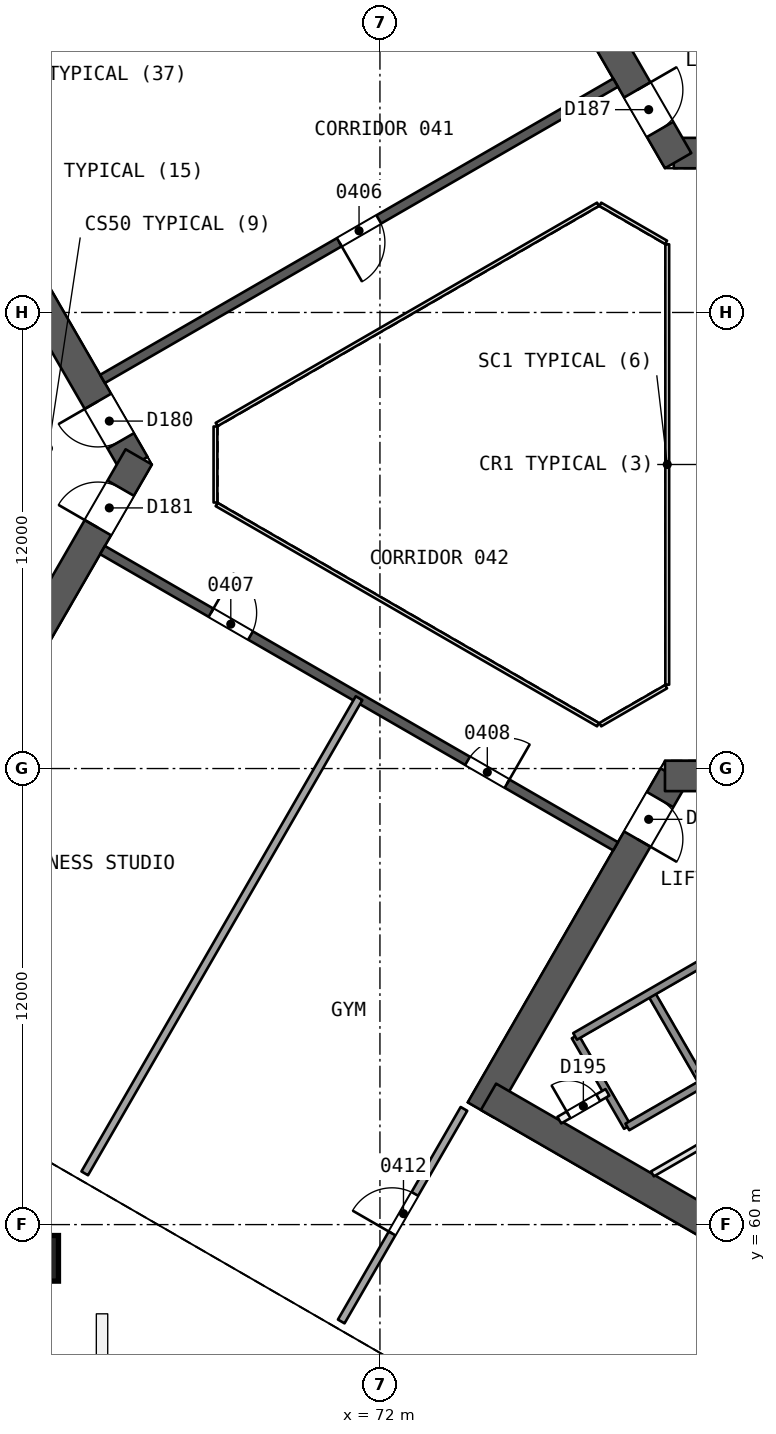
"""IFC4 building model, lengths in metres.
Left out: names, types, materials, properties, quantities, classifications, styles, units other than length and angle.
Written with IfcOpenShell. Run it as: python <this file> out.ifc"""

import sys

from ifc_helpers import new_model, si_unit, direction, frame, frame_2d, origin, origin_2d, place, context, subcontext, project, spatial, rectangle, extrude, element, fill, save


model = new_model("IFC4")
c1 = context("Model", 3, precision=1e-05, world=origin(), true_north=direction((0.0, 1.0)))
c2 = subcontext(c1, "Body", "Model", "MODEL_VIEW")
j1 = project(units=[si_unit("LENGTHUNIT", "METRE"), si_unit("PLANEANGLEUNIT", "RADIAN")], contexts=[c1])
p1 = place(None, origin())
s1 = spatial("IfcSite", under=j1, at=p1, CompositionType="ELEMENT")
p2 = place(p1, origin())
s2 = spatial("IfcBuilding", under=s1, at=p2, CompositionType="ELEMENT")
p3 = place(p2, frame((0.0, 0.0, 25.4)))
s3 = spatial("IfcBuildingStorey", under=s2, at=p3, CompositionType="ELEMENT", Elevation=25.4)
p4 = place(p3, frame((65.538, 80.0, 0.0), z_axis=(0.0, 0.0, 1.0), x_axis=(-0.49999662545, 0.866027352073, 0.0)))
e1 = element("IfcWall", 1, at=p4, inside=s3, PredefinedType="SHEAR", context=c2, shape_type="SweptSolid", body=[
    extrude(rectangle(XDim=10.149, YDim=0.8, at=frame_2d((5.074, 0.0))), origin(), (0.0, 0.0, 1.0), 4.6),
])
p5 = place(p4, frame((0.719, 0.0, 0.0)))
e2 = element("IfcOpeningElement", 2, at=p5, cuts=e1, PredefinedType="OPENING", context=c2, shape_type="SweptSolid", body=[
    extrude(rectangle(XDim=1.2, YDim=2.1, at=frame_2d((0.6, 1.05))), frame((0.0, 0.411, 0.0), z_axis=(0.0, -1.0, 0.0), x_axis=(1.0, 0.0, 0.0)), (0.0, 0.0, 1.0), 0.821),
])
p6 = place(p3, frame((60.664, 71.557, 0.0), z_axis=(0.0, 0.0, 1.0), x_axis=(0.50000409368, 0.866023040284, 0.0)))
e3 = element("IfcWall", 3, at=p6, inside=s3, PredefinedType="SHEAR", context=c2, shape_type="SweptSolid", body=[
    extrude(rectangle(XDim=9.98, YDim=0.8, at=frame_2d((4.99, 0.0))), origin(), (0.0, 0.0, 1.0), 4.6),
])
p7 = place(p6, frame((7.83, 0.0, 0.0)))
e4 = element("IfcOpeningElement", 4, at=p7, cuts=e3, PredefinedType="OPENING", context=c2, shape_type="SweptSolid", body=[
    extrude(rectangle(XDim=1.2, YDim=2.1, at=frame_2d((0.6, 1.05))), frame((0.0, 0.411, 0.0), z_axis=(0.0, -1.0, 0.0), x_axis=(1.0, 0.0, 0.0)), (0.0, 0.0, 1.0), 0.821),
])
p8 = place(p3, frame((79.731, 88.194, 0.0), z_axis=(0.0, 0.0, 1.0), x_axis=(1.0, 0.0, 0.0)))
e5 = element("IfcWall", 5, at=p8, inside=s3, PredefinedType="SHEAR", context=c2, shape_type="SweptSolid", body=[
    extrude(rectangle(XDim=10.149, YDim=0.8, at=frame_2d((5.074, 0.0))), origin(), (0.0, 0.0, 1.0), 4.6),
])
p9 = place(p8, frame((0.719, 0.0, 0.0)))
e6 = element("IfcOpeningElement", 6, at=p9, cuts=e5, PredefinedType="OPENING", context=c2, shape_type="SweptSolid", body=[
    extrude(rectangle(XDim=1.2, YDim=2.1, at=frame_2d((0.6, 1.05))), frame((0.0, 0.411, 0.0), z_axis=(0.0, -1.0, 0.0), x_axis=(1.0, 0.0, 0.0)), (0.0, 0.0, 1.0), 0.821),
])
p10 = place(p3, frame((74.856, 96.637, 0.0), z_axis=(0.0, 0.0, 1.0), x_axis=(0.499993500917, -0.866029155999, 0.0)))
e7 = element("IfcWall", 7, at=p10, inside=s3, PredefinedType="SHEAR", context=c2, shape_type="SweptSolid", body=[
    extrude(rectangle(XDim=9.98, YDim=0.8, at=frame_2d((4.99, 0.0))), origin(), (0.0, 0.0, 1.0), 4.6),
])
p11 = place(p10, frame((7.83, 0.0, 0.0)))
e8 = element("IfcOpeningElement", 8, at=p11, cuts=e7, PredefinedType="OPENING", context=c2, shape_type="SweptSolid", body=[
    extrude(rectangle(XDim=1.2, YDim=2.1, at=frame_2d((0.6, 1.05))), frame((0.0, 0.411, 0.0), z_axis=(0.0, -1.0, 0.0), x_axis=(1.0, 0.0, 0.0)), (0.0, 0.0, 1.0), 0.821),
])
p12 = place(p3, frame((79.731, 71.806, 0.0), z_axis=(0.0, 0.0, 1.0), x_axis=(-0.49999662545, -0.866027352073, 0.0)))
e9 = element("IfcWall", 9, at=p12, inside=s3, PredefinedType="SHEAR", context=c2, shape_type="SweptSolid", body=[
    extrude(rectangle(XDim=10.149, YDim=0.8, at=frame_2d((5.074, 0.0))), origin(), (0.0, 0.0, 1.0), 4.6),
])
p13 = place(p12, frame((0.719, 0.0, 0.0)))
e10 = element("IfcOpeningElement", 10, at=p13, cuts=e9, PredefinedType="OPENING", context=c2, shape_type="SweptSolid", body=[
    extrude(rectangle(XDim=1.2, YDim=2.1, at=frame_2d((0.6, 1.05))), frame((0.0, 0.411, 0.0), z_axis=(0.0, -1.0, 0.0), x_axis=(1.0, 0.0, 0.0)), (0.0, 0.0, 1.0), 0.821),
])
p14 = place(p3, frame((74.856, 63.363, 0.0), z_axis=(0.0, 0.0, 1.0), x_axis=(0.866029478545, -0.499992942241, 0.0)))
e11 = element("IfcWall", 11, at=p14, inside=s3, PredefinedType="SHEAR", context=c2, shape_type="SweptSolid", body=[
    extrude(rectangle(XDim=13.933, YDim=0.8, at=frame_2d((6.967, 0.0))), origin(), (0.0, 0.0, 1.0), 4.6),
])
p15 = place(p3, frame((89.48, 71.806, 0.0), z_axis=(0.0, 0.0, 1.0), x_axis=(-1.0, 0.0, 0.0)))
e12 = element("IfcWall", 12, at=p15, inside=s3, PredefinedType="SHEAR", context=c2, shape_type="SweptSolid", body=[
    extrude(rectangle(XDim=9.98, YDim=0.8, at=frame_2d((4.99, 0.0))), origin(), (0.0, 0.0, 1.0), 4.6),
])
p16 = place(p15, frame((7.83, 0.0, 0.0)))
e13 = element("IfcOpeningElement", 13, at=p16, cuts=e12, PredefinedType="OPENING", context=c2, shape_type="SweptSolid", body=[
    extrude(rectangle(XDim=1.2, YDim=2.1, at=frame_2d((0.6, 1.05))), frame((0.0, 0.411, 0.0), z_axis=(0.0, -1.0, 0.0), x_axis=(1.0, 0.0, 0.0)), (0.0, 0.0, 1.0), 0.821),
])
p17 = place(p3, frame((78.2, 90.046, 0.0), z_axis=(0.0, 0.0, 1.0), x_axis=(-0.866026492143, -0.499998114903, 0.0)))
e14 = element("IfcWall", 14, at=p17, inside=s3, PredefinedType="SHEAR", context=c2, shape_type="SweptSolid", body=[
    extrude(rectangle(XDim=15.588, YDim=0.25, at=frame_2d((7.794, 0.0))), origin(), (0.0, 0.0, 1.0), 4.1),
])
p18 = place(p17, frame((7.194, 0.0, 0.0)))
e15 = element("IfcOpeningElement", 15, at=p18, cuts=e14, PredefinedType="OPENING", context=c2, shape_type="SweptSolid", body=[
    extrude(rectangle(XDim=1.2, YDim=2.4, at=frame_2d((0.6, 1.2))), frame((0.0, 0.135, 0.0), z_axis=(0.0, -1.0, 0.0), x_axis=(1.0, 0.0, 0.0)), (0.0, 0.0, 1.0), 0.271),
])
p19 = place(p3, frame((64.7, 77.748, 0.0), z_axis=(0.0, 0.0, 1.0), x_axis=(0.866026492143, -0.499998114903, 0.0)))
e16 = element("IfcWall", 16, at=p19, inside=s3, PredefinedType="SHEAR", context=c2, shape_type="SweptSolid", body=[
    extrude(rectangle(XDim=15.588, YDim=0.25, at=frame_2d((7.794, 0.0))), origin(), (0.0, 0.0, 1.0), 4.1),
])
p20 = place(p19, frame((3.297, 0.0, 0.0)))
e17 = element("IfcOpeningElement", 17, at=p20, cuts=e16, PredefinedType="OPENING", context=c2, shape_type="SweptSolid", body=[
    extrude(rectangle(XDim=1.2, YDim=2.4, at=frame_2d((0.6, 1.2))), frame((0.0, 0.135, 0.0), z_axis=(0.0, -1.0, 0.0), x_axis=(1.0, 0.0, 0.0)), (0.0, 0.0, 1.0), 0.271),
])
p21 = place(p19, frame((11.091, 0.0, 0.0)))
e18 = element("IfcOpeningElement", 18, at=p21, cuts=e16, PredefinedType="OPENING", context=c2, shape_type="SweptSolid", body=[
    extrude(rectangle(XDim=1.2, YDim=2.4, at=frame_2d((0.6, 1.2))), frame((0.0, 0.135, 0.0), z_axis=(0.0, -1.0, 0.0), x_axis=(1.0, 0.0, 0.0)), (0.0, 0.0, 1.0), 0.271),
])
p22 = place(p3, frame((62.928, 59.092, 0.0), z_axis=(0.010134853242, 0.017510479423, 0.999795312982), x_axis=(-0.865488230984, 0.500929258506, 8.4747e-08)))
e19 = element("IfcColumn", 19, at=p22, inside=s3, PredefinedType="COLUMN", context=c2, shape_type="SweptSolid", body=[
    extrude(rectangle(XDim=1.2, YDim=1.2, at=origin_2d()), origin(), (0.0, 0.0, 1.0), 4.601),
])
p23 = place(p3, frame((64.231, 61.349, 0.0), z_axis=(0.0, 0.0, 1.0), x_axis=(0.500003999814, 0.866023094479, 0.0)))
e20 = element("IfcWall", 20, at=p23, inside=s3, PredefinedType="PARTITIONING", context=c2, shape_type="SweptSolid", body=[
    extrude(rectangle(XDim=14.437, YDim=0.2, at=frame_2d((7.219, 0.0))), origin(), (0.0, 0.0, 1.0), 4.1),
])
p24 = place(p3, frame((70.981, 57.451, 0.0), z_axis=(0.0, 0.0, 1.0), x_axis=(0.500001702147, 0.866024421047, 0.0)))
e21 = element("IfcWall", 21, at=p24, inside=s3, PredefinedType="PARTITIONING", context=c2, shape_type="SweptSolid", body=[
    extrude(rectangle(XDim=6.458, YDim=0.2, at=frame_2d((3.229, 0.0))), origin(), (0.0, 0.0, 1.0), 4.1),
])
p25 = place(p24, frame((2.675, 0.0, 0.0)))
e22 = element("IfcOpeningElement", 22, at=p25, cuts=e21, PredefinedType="OPENING", context=c2, shape_type="SweptSolid", body=[
    extrude(rectangle(XDim=1.2, YDim=2.4, at=frame_2d((0.6, 1.2))), frame((0.0, 0.11, 0.0), z_axis=(0.0, -1.0, 0.0), x_axis=(1.0, 0.0, 0.0)), (0.0, 0.0, 1.0), 0.221),
])
p26 = place(p3, frame((86.77, 89.486, 0.0), z_axis=(0.0, 0.0, 1.0), x_axis=(-0.86601811187, 0.500012629753, 0.0)))
e23 = element("IfcWall", 23, at=p26, inside=s3, PredefinedType="SOLIDWALL", context=c2, shape_type="SweptSolid", body=[
    extrude(rectangle(XDim=10.9, YDim=0.2, at=frame_2d((5.45, 0.0))), origin(), (0.0, 0.0, 1.0), 4.1),
])
for number, where, z_axis, x_axis in (
    (24, (77.135, 64.952, 0.0), (0.0, 0.0, 1.0), (0.5, -0.866, 0.0)),
    (25, (79.127, 66.102, 0.0), (0.0, 0.0, 1.0), (0.5, -0.866, 0.0)),
):
    element("IfcWall", number, at=place(p3, frame(where, z_axis=z_axis, x_axis=x_axis)), inside=s3, PredefinedType="SOLIDWALL", context=c2, shape_type="SweptSolid", body=[
        extrude(rectangle(XDim=2.75, YDim=0.2, at=frame_2d((1.375, 0.0))), origin(), (0.0, 0.0, 1.0), 4.1),
    ])
p27 = place(p3, frame((77.135, 64.952, 0.0), z_axis=(0.0, 0.0, 1.0), x_axis=(0.866031916153, 0.499988720078, 0.0)))
e26 = element("IfcWall", 26, at=p27, inside=s3, PredefinedType="SOLIDWALL", context=c2, shape_type="SweptSolid", body=[
    extrude(rectangle(XDim=11.35, YDim=0.2, at=frame_2d((5.675, 0.0))), origin(), (0.0, 0.0, 1.0), 4.1),
])
p28 = place(p3, frame((76.72, 62.749, 0.0), z_axis=(0.0, 0.0, 1.0), x_axis=(0.866054810376, 0.49994906283, 0.0)))
e27 = element("IfcWall", 27, at=p28, inside=s3, PredefinedType="PARTITIONING", context=c2, shape_type="SweptSolid", body=[
    extrude(rectangle(XDim=1.461, YDim=0.2, at=frame_2d((0.73, 0.0))), origin(), (0.0, 0.0, 1.0), 4.1),
])
p29 = place(p28, frame((0.281, 0.0, 0.0)))
e28 = element("IfcOpeningElement", 28, at=p29, cuts=e27, PredefinedType="OPENING", context=c2, shape_type="SweptSolid", body=[
    extrude(rectangle(XDim=0.9, YDim=2.1, at=frame_2d((0.45, 1.05))), frame((0.0, 0.11, 0.0), z_axis=(0.0, -1.0, 0.0), x_axis=(1.0, 0.0, 0.0)), (0.0, 0.0, 1.0), 0.221),
])
p30 = place(p3, frame((80.367, 63.954, 0.0), z_axis=(0.0, 0.0, 1.0), x_axis=(0.866026575979, 0.499997969693, 0.0)))
e29 = element("IfcWall", 29, at=p30, inside=s3, PredefinedType="SOLIDWALL", context=c2, shape_type="SweptSolid", body=[
    extrude(rectangle(XDim=6.75, YDim=0.2, at=frame_2d((3.375, 0.0))), origin(), (0.0, 0.0, 1.0), 4.1),
])
p31 = place(p3, frame((78.51, 62.57, 0.0), z_axis=(0.0, 0.0, 1.0), x_axis=(0.866053019151, 0.499952165731, 0.0)))
e30 = element("IfcWall", 30, at=p31, inside=s3, PredefinedType="SOLIDWALL", context=c2, shape_type="SweptSolid", body=[
    extrude(rectangle(XDim=2.3, YDim=0.2, at=frame_2d((1.15, 0.0))), origin(), (0.0, 0.0, 1.0), 4.1),
])
p32 = place(p3, frame((79.17, 61.334, 0.0), z_axis=(0.0, 0.0, 1.0), x_axis=(0.866030041738, 0.499991966744, 0.0)))
e31 = element("IfcWall", 31, at=p32, inside=s3, PredefinedType="PARTITIONING", context=c2, shape_type="SweptSolid", body=[
    extrude(rectangle(XDim=2.222, YDim=0.15, at=frame_2d((1.111, 0.0))), origin(), (0.0, 0.0, 1.0), 4.1),
])
p33 = place(p3, frame((79.56, 74.206, 0.0), z_axis=(0.0, 0.0, 1.0), x_axis=(0.0, 1.0, 0.0)))
e32 = element("IfcWall", 32, at=p33, inside=s3, PredefinedType="PARTITIONING", context=c2, shape_type="SweptSolid", body=[
    extrude(rectangle(XDim=11.588, YDim=0.1, at=frame_2d((5.794, 0.0))), origin(), (0.0, 0.0, 1.0), 4.1),
])
p34 = place(p3, frame((79.53, 85.846, 0.0), z_axis=(0.0, 0.0, 1.0), x_axis=(-0.866041268327, 0.499972520799, 0.0)))
e33 = element("IfcWall", 33, at=p34, inside=s3, PredefinedType="PARTITIONING", context=c2, shape_type="SweptSolid", body=[
    extrude(rectangle(XDim=2.0, YDim=0.1, at=frame_2d((1.0, 0.0))), origin(), (0.0, 0.0, 1.0), 4.1),
])
p35 = place(p3, frame((77.738, 86.846, 0.0), z_axis=(0.0, 0.0, 1.0), x_axis=(-0.866026658274, -0.499997827154, 0.0)))
e34 = element("IfcWall", 34, at=p35, inside=s3, PredefinedType="PARTITIONING", context=c2, shape_type="SweptSolid", body=[
    extrude(rectangle(XDim=11.588, YDim=0.1, at=frame_2d((5.794, 0.0))), origin(), (0.0, 0.0, 1.0), 4.1),
])
p36 = place(p3, frame((67.672, 81.0, 0.0), z_axis=(0.0, 0.0, 1.0), x_axis=(0.0, -1.0, 0.0)))
e35 = element("IfcWall", 35, at=p36, inside=s3, PredefinedType="PARTITIONING", context=c2, shape_type="SweptSolid", body=[
    extrude(rectangle(XDim=2.0, YDim=0.1, at=frame_2d((1.0, 0.0))), origin(), (0.0, 0.0, 1.0), 4.1),
])
p37 = place(p3, frame((67.702, 78.948, 0.0), z_axis=(0.0, 0.0, 1.0), x_axis=(0.866026658274, -0.499997827154, 0.0)))
e36 = element("IfcWall", 36, at=p37, inside=s3, PredefinedType="PARTITIONING", context=c2, shape_type="SweptSolid", body=[
    extrude(rectangle(XDim=11.588, YDim=0.1, at=frame_2d((5.794, 0.0))), origin(), (0.0, 0.0, 1.0), 4.1),
])
p38 = place(p3, frame((77.798, 73.154, 0.0), z_axis=(0.0, 0.0, 1.0), x_axis=(0.866041268327, 0.499972520799, 0.0)))
e37 = element("IfcWall", 37, at=p38, inside=s3, PredefinedType="PARTITIONING", context=c2, shape_type="SweptSolid", body=[
    extrude(rectangle(XDim=2.0, YDim=0.1, at=frame_2d((1.0, 0.0))), origin(), (0.0, 0.0, 1.0), 4.1),
])
p39 = place(p18, origin())
e38 = element("IfcDoor", 38, at=p39, inside=s3, OperationType="SINGLE_SWING_RIGHT", PredefinedType="NOTDEFINED", context=c2, shape_type="SweptSolid", body=[
    extrude(rectangle(XDim=1.2, YDim=2.4, at=frame_2d((0.6, 1.2))), frame((0.0, 0.025, 0.0), z_axis=(0.0, -1.0, 0.0), x_axis=(1.0, 0.0, 0.0)), (0.0, 0.0, 1.0), 0.05),
])
fill(e15, e38)
p40 = place(p20, origin())
e39 = element("IfcDoor", 39, at=p40, inside=s3, OperationType="SINGLE_SWING_LEFT", PredefinedType="NOTDEFINED", context=c2, shape_type="SweptSolid", body=[
    extrude(rectangle(XDim=1.2, YDim=2.4, at=frame_2d((0.6, 1.2))), frame((0.0, 0.025, 0.0), z_axis=(0.0, -1.0, 0.0), x_axis=(1.0, 0.0, 0.0)), (0.0, 0.0, 1.0), 0.05),
])
fill(e17, e39)
p41 = place(p21, origin())
e40 = element("IfcDoor", 40, at=p41, inside=s3, OperationType="SINGLE_SWING_RIGHT", PredefinedType="NOTDEFINED", context=c2, shape_type="SweptSolid", body=[
    extrude(rectangle(XDim=1.2, YDim=2.4, at=frame_2d((0.6, 1.2))), frame((0.0, 0.025, 0.0), z_axis=(0.0, -1.0, 0.0), x_axis=(1.0, 0.0, 0.0)), (0.0, 0.0, 1.0), 0.05),
])
fill(e18, e40)
p42 = place(p25, origin())
e41 = element("IfcDoor", 41, at=p42, inside=s3, OperationType="SINGLE_SWING_LEFT", PredefinedType="NOTDEFINED", context=c2, shape_type="SweptSolid", body=[
    extrude(rectangle(XDim=1.2, YDim=2.4, at=frame_2d((0.6, 1.2))), frame((0.0, 0.025, 0.0), z_axis=(0.0, -1.0, 0.0), x_axis=(1.0, 0.0, 0.0)), (0.0, 0.0, 1.0), 0.05),
])
fill(e22, e41)
p43 = place(p5, origin())
e42 = element("IfcDoor", 42, at=p43, inside=s3, OperationType="SINGLE_SWING_RIGHT", PredefinedType="NOTDEFINED", context=c2, shape_type="SweptSolid", body=[
    extrude(rectangle(XDim=1.2, YDim=2.1, at=frame_2d((0.6, 1.05))), frame((0.0, 0.025, 0.0), z_axis=(0.0, -1.0, 0.0), x_axis=(1.0, 0.0, 0.0)), (0.0, 0.0, 1.0), 0.05),
])
fill(e2, e42)
p44 = place(p7, origin())
e43 = element("IfcDoor", 43, at=p44, inside=s3, OperationType="SINGLE_SWING_LEFT", PredefinedType="NOTDEFINED", context=c2, shape_type="SweptSolid", body=[
    extrude(rectangle(XDim=1.2, YDim=2.1, at=frame_2d((0.6, 1.05))), frame((0.0, 0.025, 0.0), z_axis=(0.0, -1.0, 0.0), x_axis=(1.0, 0.0, 0.0)), (0.0, 0.0, 1.0), 0.05),
])
fill(e4, e43)
p45 = place(p11, origin())
e44 = element("IfcDoor", 44, at=p45, inside=s3, OperationType="SINGLE_SWING_LEFT", PredefinedType="NOTDEFINED", context=c2, shape_type="SweptSolid", body=[
    extrude(rectangle(XDim=1.2, YDim=2.1, at=frame_2d((0.6, 1.05))), frame((0.0, 0.025, 0.0), z_axis=(0.0, -1.0, 0.0), x_axis=(1.0, 0.0, 0.0)), (0.0, 0.0, 1.0), 0.05),
])
fill(e8, e44)
p46 = place(p13, origin())
e45 = element("IfcDoor", 45, at=p46, inside=s3, OperationType="SINGLE_SWING_RIGHT", PredefinedType="NOTDEFINED", context=c2, shape_type="SweptSolid", body=[
    extrude(rectangle(XDim=1.2, YDim=2.1, at=frame_2d((0.6, 1.05))), frame((0.0, 0.025, 0.0), z_axis=(0.0, -1.0, 0.0), x_axis=(1.0, 0.0, 0.0)), (0.0, 0.0, 1.0), 0.05),
])
fill(e10, e45)
p47 = place(p29, origin())
e46 = element("IfcDoor", 46, at=p47, inside=s3, OperationType="SINGLE_SWING_LEFT", PredefinedType="NOTDEFINED", context=c2, shape_type="SweptSolid", body=[
    extrude(rectangle(XDim=0.9, YDim=2.1, at=frame_2d((0.45, 1.05))), frame((0.0, 0.025, 0.0), z_axis=(0.0, -1.0, 0.0), x_axis=(1.0, 0.0, 0.0)), (0.0, 0.0, 1.0), 0.05),
])
fill(e28, e46)
save(model, sys.argv[1])
